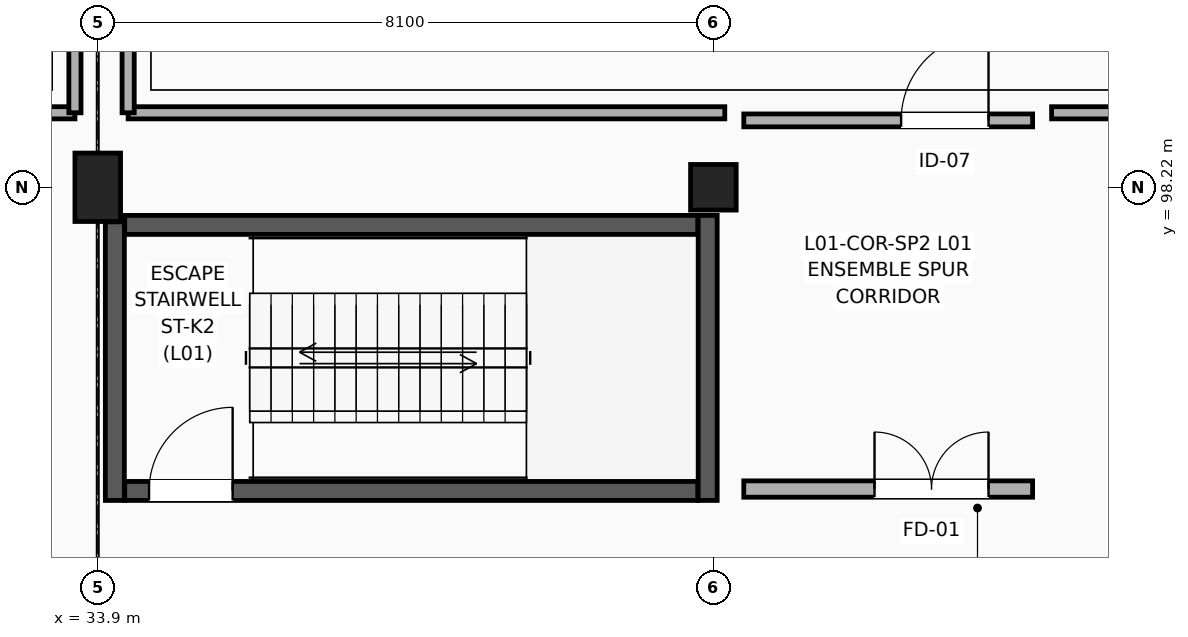
"""IFC4 building model, lengths in metres.
Left out: names, types, materials, properties, quantities, classifications, styles, units other than length and angle.
Written with IfcOpenShell. Run it as: python <this file> out.ifc"""

import sys

from ifc_helpers import new_model, si_unit, direction, frame, frame_2d, origin, origin_2d, place, context, subcontext, project, spatial, rectangle, extrude, element, fill, save


model = new_model("IFC4")
c1 = context("Model", 3, precision=1e-05, world=origin(), true_north=direction((0.0, 1.0)))
c2 = subcontext(c1, "Body", "Model", "MODEL_VIEW")
j1 = project(units=[si_unit("LENGTHUNIT", "METRE"), si_unit("PLANEANGLEUNIT", "RADIAN")], contexts=[c1])
p1 = place(None, origin())
s1 = spatial("IfcSite", under=j1, at=p1, CompositionType="ELEMENT")
p2 = place(p1, origin())
s2 = spatial("IfcBuilding", under=s1, at=p2, CompositionType="ELEMENT")
p3 = place(p2, frame((0.0, 0.0, 5.4)))
s3 = spatial("IfcBuildingStorey", under=s2, at=p3, CompositionType="ELEMENT", Elevation=5.4)
p4 = place(p3, frame((33.9, 98.22, 0.0), z_axis=(0.0, 0.0, 1.0), x_axis=(1.0, 0.0, 0.0)))
e1 = element("IfcColumn", 1, at=p4, inside=s3, PredefinedType="COLUMN", context=c2, shape_type="SweptSolid", body=[
    extrude(rectangle(XDim=0.6, YDim=0.9, at=origin_2d()), origin(), (0.0, 0.0, 1.0), 4.8),
])
p5 = place(p3, frame((42.0, 98.22, 0.0), z_axis=(0.0, 0.0, 1.0), x_axis=(1.0, 0.0, 0.0)))
e2 = element("IfcColumn", 2, at=p5, inside=s3, PredefinedType="COLUMN", context=c2, shape_type="SweptSolid", body=[
    extrude(rectangle(XDim=0.6, YDim=0.6, at=origin_2d()), origin(), (0.0, 0.0, 1.0), 4.8),
])
p6 = place(p3, frame((34.255, 94.225, 0.0), z_axis=(0.0, 0.0, 1.0), x_axis=(1.0, 0.0, 0.0)))
e3 = element("IfcWall", 3, at=p6, inside=s3, PredefinedType="SHEAR", context=c2, shape_type="SweptSolid", body=[
    extrude(rectangle(XDim=7.54, YDim=0.25, at=frame_2d((3.77, 0.0))), origin(), (0.0, 0.0, 1.0), 4.525),
])
p7 = place(p6, frame((0.32, 0.0, 0.0)))
e4 = element("IfcOpeningElement", 4, at=p7, cuts=e3, PredefinedType="OPENING", context=c2, shape_type="SweptSolid", body=[
    extrude(rectangle(XDim=1.1, YDim=2.2, at=frame_2d((0.55, 1.1))), frame((0.0, 0.135, 0.0), z_axis=(0.0, -1.0, 0.0), x_axis=(1.0, 0.0, 0.0)), (0.0, 0.0, 1.0), 0.27),
])
p8 = place(p3, frame((34.255, 97.725, 0.0), z_axis=(0.0, 0.0, 1.0), x_axis=(1.0, 0.0, 0.0)))
e5 = element("IfcWall", 5, at=p8, inside=s3, PredefinedType="SHEAR", context=c2, shape_type="SweptSolid", body=[
    extrude(rectangle(XDim=7.54, YDim=0.25, at=frame_2d((3.77, 0.0))), origin(), (0.0, 0.0, 1.0), 4.525),
])
p9 = place(p3, frame((34.125, 94.1, 0.0), z_axis=(0.0, 0.0, 1.0), x_axis=(0.0, 1.0, 0.0)))
e6 = element("IfcWall", 6, at=p9, inside=s3, PredefinedType="SHEAR", context=c2, shape_type="SweptSolid", body=[
    extrude(rectangle(XDim=3.665, YDim=0.25, at=frame_2d((1.833, 0.0))), origin(), (0.0, 0.0, 1.0), 4.525),
])
p10 = place(p3, frame((41.925, 94.1, 0.0), z_axis=(0.0, 0.0, 1.0), x_axis=(0.0, 1.0, 0.0)))
e7 = element("IfcWall", 7, at=p10, inside=s3, PredefinedType="SHEAR", context=c2, shape_type="SweptSolid", body=[
    extrude(rectangle(XDim=3.75, YDim=0.25, at=frame_2d((1.875, 0.0))), origin(), (0.0, 0.0, 1.0), 4.525),
])
p11 = place(p3, frame((42.4, 94.25, 0.0), z_axis=(0.0, 0.0, 1.0), x_axis=(1.0, 0.0, 0.0)))
e8 = element("IfcWall", 8, at=p11, inside=s3, PredefinedType="PARTITIONING", context=c2, shape_type="SweptSolid", body=[
    extrude(rectangle(XDim=3.8, YDim=0.215, at=frame_2d((1.9, 0.0))), origin(), (0.0, 0.0, 1.0), 4.127),
])
p12 = place(p11, frame((1.72, 0.0, 0.0)))
e9 = element("IfcOpeningElement", 9, at=p12, cuts=e8, PredefinedType="OPENING", context=c2, shape_type="SweptSolid", body=[
    extrude(rectangle(XDim=1.5, YDim=2.2, at=frame_2d((0.75, 1.1))), frame((0.0, 0.117, 0.0), z_axis=(0.0, -1.0, 0.0), x_axis=(1.0, 0.0, 0.0)), (0.0, 0.0, 1.0), 0.235),
])
p13 = place(p3, frame((42.4, 99.1, 0.0), z_axis=(0.0, 0.0, 1.0), x_axis=(1.0, 0.0, 0.0)))
e10 = element("IfcWall", 10, at=p13, inside=s3, PredefinedType="PARTITIONING", context=c2, shape_type="SweptSolid", body=[
    extrude(rectangle(XDim=3.8, YDim=0.17, at=frame_2d((1.9, 0.0))), origin(), (0.0, 0.0, 1.0), 4.087),
])
p14 = place(p13, frame((2.07, 0.0, 0.0)))
e11 = element("IfcOpeningElement", 11, at=p14, cuts=e10, PredefinedType="OPENING", context=c2, shape_type="SweptSolid", body=[
    extrude(rectangle(XDim=1.15, YDim=2.25, at=frame_2d((0.575, 1.125))), frame((0.0, 0.095, 0.0), z_axis=(0.0, -1.0, 0.0), x_axis=(1.0, 0.0, 0.0)), (0.0, 0.0, 1.0), 0.19),
])
p15 = place(p3, frame((22.05, 99.2, 0.0), z_axis=(0.0, 0.0, 1.0), x_axis=(1.0, 0.0, 0.0)))
e12 = element("IfcWall", 12, at=p15, inside=s3, PredefinedType="PARTITIONING", context=c2, shape_type="SweptSolid", body=[
    extrude(rectangle(XDim=11.55, YDim=0.16, at=frame_2d((5.775, 0.0))), origin(), (0.0, 0.0, 1.0), 3.837),
])
p16 = place(p3, frame((33.6, 99.2, 0.0), z_axis=(0.0, 0.0, 1.0), x_axis=(0.0, 1.0, 0.0)))
e13 = element("IfcWall", 13, at=p16, inside=s3, PredefinedType="PARTITIONING", context=c2, shape_type="SweptSolid", body=[
    extrude(rectangle(XDim=11.89, YDim=0.16, at=frame_2d((5.945, 0.0))), origin(), (0.0, 0.0, 1.0), 3.687),
])
p17 = place(p3, frame((34.3, 99.2, 0.0), z_axis=(0.0, 0.0, 1.0), x_axis=(1.0, 0.0, 0.0)))
e14 = element("IfcWall", 14, at=p17, inside=s3, PredefinedType="PARTITIONING", context=c2, shape_type="SweptSolid", body=[
    extrude(rectangle(XDim=7.85, YDim=0.16, at=frame_2d((3.925, 0.0))), origin(), (0.0, 0.0, 1.0), 3.837),
])
p18 = place(p3, frame((46.45, 99.2, 0.0), z_axis=(0.0, 0.0, 1.0), x_axis=(1.0, 0.0, 0.0)))
e15 = element("IfcWall", 15, at=p18, inside=s3, PredefinedType="PARTITIONING", context=c2, shape_type="SweptSolid", body=[
    extrude(rectangle(XDim=19.35, YDim=0.16, at=frame_2d((9.675, 0.0))), origin(), (0.0, 0.0, 1.0), 3.837),
])
p19 = place(p3, frame((34.3, 99.2, 0.0), z_axis=(0.0, 0.0, 1.0), x_axis=(0.0, 1.0, 0.0)))
e16 = element("IfcWall", 16, at=p19, inside=s3, PredefinedType="PARTITIONING", context=c2, shape_type="SweptSolid", body=[
    extrude(rectangle(XDim=13.2, YDim=0.16, at=frame_2d((6.6, 0.0))), origin(), (0.0, 0.0, 1.0), 3.987),
])
p20 = place(p7, origin())
e17 = element("IfcDoor", 17, at=p20, inside=s3, OperationType="SINGLE_SWING_RIGHT", PredefinedType="DOOR", context=c2, shape_type="SweptSolid", body=[
    extrude(rectangle(XDim=1.1, YDim=2.2, at=frame_2d((0.55, 1.1))), frame((0.0, 0.025, 0.0), z_axis=(0.0, -1.0, 0.0), x_axis=(1.0, 0.0, 0.0)), (0.0, 0.0, 1.0), 0.05),
])
fill(e4, e17)
p21 = place(p12, origin())
e18 = element("IfcDoor", 18, at=p21, inside=s3, OperationType="DOUBLE_DOOR_SINGLE_SWING", PredefinedType="DOOR", context=c2, shape_type="SweptSolid", body=[
    extrude(rectangle(XDim=1.5, YDim=2.2, at=frame_2d((0.75, 1.1))), frame((0.0, 0.025, 0.0), z_axis=(0.0, -1.0, 0.0), x_axis=(1.0, 0.0, 0.0)), (0.0, 0.0, 1.0), 0.05),
])
fill(e9, e18)
p22 = place(p14, origin())
e19 = element("IfcDoor", 19, at=p22, inside=s3, OperationType="SINGLE_SWING_RIGHT", PredefinedType="DOOR", context=c2, shape_type="SweptSolid", body=[
    extrude(rectangle(XDim=1.15, YDim=2.25, at=frame_2d((0.575, 1.125))), frame((0.0, 0.025, 0.0), z_axis=(0.0, -1.0, 0.0), x_axis=(1.0, 0.0, 0.0)), (0.0, 0.0, 1.0), 0.05),
])
fill(e11, e19)
save(model, sys.argv[1])
